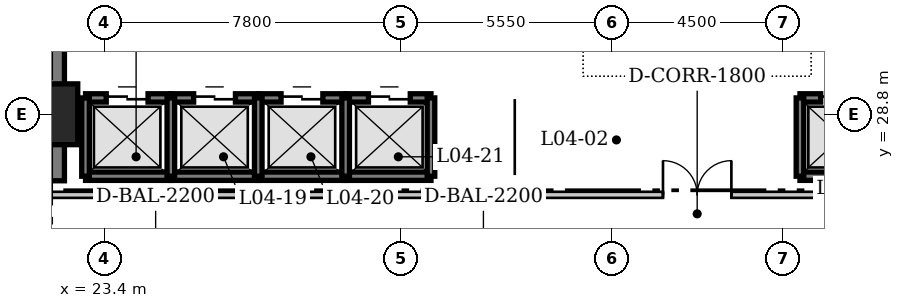
"""IFC4 building model, lengths in metres.
Left out: names, types, materials, properties, quantities, classifications, styles, units other than length and angle.
Written with IfcOpenShell. Run it as: python <this file> out.ifc"""

import sys

from ifc_helpers import new_model, si_unit, direction, frame, frame_2d, origin, origin_2d, place, context, subcontext, project, spatial, rectangle, extrude, element, fill, save


model = new_model("IFC4")
c1 = context("Model", 3, precision=1e-05, world=origin(), true_north=direction((0.0, 1.0)))
c2 = subcontext(c1, "Body", "Model", "MODEL_VIEW")
j1 = project(units=[si_unit("LENGTHUNIT", "METRE"), si_unit("PLANEANGLEUNIT", "RADIAN")], contexts=[c1])
p1 = place(None, origin())
s1 = spatial("IfcSite", under=j1, at=p1, CompositionType="ELEMENT")
p2 = place(p1, origin())
s2 = spatial("IfcBuilding", under=s1, at=p2, CompositionType="ELEMENT")
p3 = place(p2, frame((0.0, 0.0, 20.8)))
s3 = spatial("IfcBuildingStorey", under=s2, at=p3, CompositionType="ELEMENT", Elevation=20.8)
p4 = place(p3, frame((21.9, 27.05, 0.0), z_axis=(0.0, 0.0, 1.0), x_axis=(0.0, 1.0, 0.0)))
e1 = element("IfcWall", 1, at=p4, inside=s3, PredefinedType="SHEAR", context=c2, shape_type="SweptSolid", body=[
    extrude(rectangle(XDim=13.72, YDim=0.9, at=frame_2d((6.86, 0.0))), origin(), (0.0, 0.0, 1.0), 5.2),
])
p5 = place(p3, frame((21.9, 28.8, 0.0), z_axis=(0.0, 0.0, 1.0), x_axis=(1.0, 0.0, 0.0)))
e2 = element("IfcColumn", 2, at=p5, inside=s3, PredefinedType="COLUMN", context=c2, shape_type="SweptSolid", body=[
    extrude(rectangle(XDim=1.6, YDim=1.6, at=origin_2d()), origin(), (0.0, 0.0, 1.0), 5.2),
])
p6 = place(p3, frame((22.905, 29.23, 0.0), z_axis=(0.0, 0.0, 1.0), x_axis=(1.0, 0.0, 0.0)))
e3 = element("IfcWall", 3, at=p6, inside=s3, PredefinedType="SHEAR", context=c2, shape_type="SweptSolid", body=[
    extrude(rectangle(XDim=2.245, YDim=0.22, at=frame_2d((1.123, 0.0))), origin(), (0.0, 0.0, 1.0), 5.2),
])
p7 = place(p6, frame((0.545, 0.0, 0.0)))
e4 = element("IfcOpeningElement", 4, at=p7, cuts=e3, PredefinedType="OPENING", context=c2, shape_type="SweptSolid", body=[
    extrude(rectangle(XDim=1.1, YDim=2.15, at=frame_2d((0.55, 1.075))), frame((0.0, 0.12, 0.0), z_axis=(0.0, -1.0, 0.0), x_axis=(1.0, 0.0, 0.0)), (0.0, 0.0, 1.0), 0.24),
])
p8 = place(p3, frame((22.905, 27.17, 0.0), z_axis=(0.0, 0.0, 1.0), x_axis=(1.0, 0.0, 0.0)))
e5 = element("IfcWall", 5, at=p8, inside=s3, PredefinedType="SHEAR", context=c2, shape_type="SweptSolid", body=[
    extrude(rectangle(XDim=2.245, YDim=0.22, at=frame_2d((1.123, 0.0))), origin(), (0.0, 0.0, 1.0), 5.2),
])
p9 = place(p3, frame((22.905, 27.17, 0.0), z_axis=(0.0, 0.0, 1.0), x_axis=(0.0, 1.0, 0.0)))
e6 = element("IfcWall", 6, at=p9, inside=s3, PredefinedType="SHEAR", context=c2, shape_type="SweptSolid", body=[
    extrude(rectangle(XDim=2.06, YDim=0.2, at=frame_2d((1.03, 0.0))), origin(), (0.0, 0.0, 1.0), 5.2),
])
p10 = place(p3, frame((25.15, 29.23, 0.0), z_axis=(0.0, 0.0, 1.0), x_axis=(1.0, 0.0, 0.0)))
e7 = element("IfcWall", 7, at=p10, inside=s3, PredefinedType="SHEAR", context=c2, shape_type="SweptSolid", body=[
    extrude(rectangle(XDim=2.3, YDim=0.22, at=frame_2d((1.15, 0.0))), origin(), (0.0, 0.0, 1.0), 5.2),
])
p11 = place(p10, frame((0.6, 0.0, 0.0)))
e8 = element("IfcOpeningElement", 8, at=p11, cuts=e7, PredefinedType="OPENING", context=c2, shape_type="SweptSolid", body=[
    extrude(rectangle(XDim=1.1, YDim=2.15, at=frame_2d((0.55, 1.075))), frame((0.0, 0.12, 0.0), z_axis=(0.0, -1.0, 0.0), x_axis=(1.0, 0.0, 0.0)), (0.0, 0.0, 1.0), 0.24),
])
p12 = place(p3, frame((25.15, 27.17, 0.0), z_axis=(0.0, 0.0, 1.0), x_axis=(1.0, 0.0, 0.0)))
e9 = element("IfcWall", 9, at=p12, inside=s3, PredefinedType="SHEAR", context=c2, shape_type="SweptSolid", body=[
    extrude(rectangle(XDim=2.3, YDim=0.22, at=frame_2d((1.15, 0.0))), origin(), (0.0, 0.0, 1.0), 5.2),
])
p13 = place(p3, frame((25.15, 27.17, 0.0), z_axis=(0.0, 0.0, 1.0), x_axis=(0.0, 1.0, 0.0)))
e10 = element("IfcWall", 10, at=p13, inside=s3, PredefinedType="SHEAR", context=c2, shape_type="SweptSolid", body=[
    extrude(rectangle(XDim=2.06, YDim=0.2, at=frame_2d((1.03, 0.0))), origin(), (0.0, 0.0, 1.0), 5.2),
])
p14 = place(p3, frame((27.45, 29.23, 0.0), z_axis=(0.0, 0.0, 1.0), x_axis=(1.0, 0.0, 0.0)))
e11 = element("IfcWall", 11, at=p14, inside=s3, PredefinedType="SHEAR", context=c2, shape_type="SweptSolid", body=[
    extrude(rectangle(XDim=2.3, YDim=0.22, at=frame_2d((1.15, 0.0))), origin(), (0.0, 0.0, 1.0), 5.2),
])
p15 = place(p14, frame((0.6, 0.0, 0.0)))
e12 = element("IfcOpeningElement", 12, at=p15, cuts=e11, PredefinedType="OPENING", context=c2, shape_type="SweptSolid", body=[
    extrude(rectangle(XDim=1.1, YDim=2.15, at=frame_2d((0.55, 1.075))), frame((0.0, 0.12, 0.0), z_axis=(0.0, -1.0, 0.0), x_axis=(1.0, 0.0, 0.0)), (0.0, 0.0, 1.0), 0.24),
])
p16 = place(p3, frame((27.45, 27.17, 0.0), z_axis=(0.0, 0.0, 1.0), x_axis=(1.0, 0.0, 0.0)))
e13 = element("IfcWall", 13, at=p16, inside=s3, PredefinedType="SHEAR", context=c2, shape_type="SweptSolid", body=[
    extrude(rectangle(XDim=2.3, YDim=0.22, at=frame_2d((1.15, 0.0))), origin(), (0.0, 0.0, 1.0), 5.2),
])
p17 = place(p3, frame((27.45, 27.17, 0.0), z_axis=(0.0, 0.0, 1.0), x_axis=(0.0, 1.0, 0.0)))
e14 = element("IfcWall", 14, at=p17, inside=s3, PredefinedType="SHEAR", context=c2, shape_type="SweptSolid", body=[
    extrude(rectangle(XDim=2.06, YDim=0.2, at=frame_2d((1.03, 0.0))), origin(), (0.0, 0.0, 1.0), 5.2),
])
p18 = place(p3, frame((29.75, 29.23, 0.0), z_axis=(0.0, 0.0, 1.0), x_axis=(1.0, 0.0, 0.0)))
e15 = element("IfcWall", 15, at=p18, inside=s3, PredefinedType="SHEAR", context=c2, shape_type="SweptSolid", body=[
    extrude(rectangle(XDim=2.245, YDim=0.22, at=frame_2d((1.123, 0.0))), origin(), (0.0, 0.0, 1.0), 5.2),
])
p19 = place(p18, frame((0.6, 0.0, 0.0)))
e16 = element("IfcOpeningElement", 16, at=p19, cuts=e15, PredefinedType="OPENING", context=c2, shape_type="SweptSolid", body=[
    extrude(rectangle(XDim=1.1, YDim=2.15, at=frame_2d((0.55, 1.075))), frame((0.0, 0.12, 0.0), z_axis=(0.0, -1.0, 0.0), x_axis=(1.0, 0.0, 0.0)), (0.0, 0.0, 1.0), 0.24),
])
p20 = place(p3, frame((29.75, 27.17, 0.0), z_axis=(0.0, 0.0, 1.0), x_axis=(1.0, 0.0, 0.0)))
e17 = element("IfcWall", 17, at=p20, inside=s3, PredefinedType="SHEAR", context=c2, shape_type="SweptSolid", body=[
    extrude(rectangle(XDim=2.245, YDim=0.22, at=frame_2d((1.123, 0.0))), origin(), (0.0, 0.0, 1.0), 5.2),
])
for number, where, z_axis, x_axis in (
    (18, (29.75, 27.17, 0.0), (0.0, 0.0, 1.0), (0.0, 1.0, 0.0)),
    (19, (31.995, 27.17, 0.0), (0.0, 0.0, 1.0), (0.0, 1.0, 0.0)),
):
    element("IfcWall", number, at=place(p3, frame(where, z_axis=z_axis, x_axis=x_axis)), inside=s3, PredefinedType="SHEAR", context=c2, shape_type="SweptSolid", body=[
        extrude(rectangle(XDim=2.06, YDim=0.2, at=frame_2d((1.03, 0.0))), origin(), (0.0, 0.0, 1.0), 5.2),
    ])
p21 = place(p3, frame((41.705, 29.23, 0.0), z_axis=(0.0, 0.0, 1.0), x_axis=(1.0, 0.0, 0.0)))
e20 = element("IfcWall", 20, at=p21, inside=s3, PredefinedType="SHEAR", context=c2, shape_type="SweptSolid", body=[
    extrude(rectangle(XDim=2.245, YDim=0.22, at=frame_2d((1.123, 0.0))), origin(), (0.0, 0.0, 1.0), 5.2),
])
p22 = place(p21, frame((0.545, 0.0, 0.0)))
e21 = element("IfcOpeningElement", 21, at=p22, cuts=e20, PredefinedType="OPENING", context=c2, shape_type="SweptSolid", body=[
    extrude(rectangle(XDim=1.1, YDim=2.15, at=frame_2d((0.55, 1.075))), frame((0.0, 0.12, 0.0), z_axis=(0.0, -1.0, 0.0), x_axis=(1.0, 0.0, 0.0)), (0.0, 0.0, 1.0), 0.24),
])
p23 = place(p3, frame((41.705, 27.17, 0.0), z_axis=(0.0, 0.0, 1.0), x_axis=(1.0, 0.0, 0.0)))
e22 = element("IfcWall", 22, at=p23, inside=s3, PredefinedType="SHEAR", context=c2, shape_type="SweptSolid", body=[
    extrude(rectangle(XDim=2.245, YDim=0.22, at=frame_2d((1.123, 0.0))), origin(), (0.0, 0.0, 1.0), 5.2),
])
p24 = place(p3, frame((41.705, 27.17, 0.0), z_axis=(0.0, 0.0, 1.0), x_axis=(0.0, 1.0, 0.0)))
e23 = element("IfcWall", 23, at=p24, inside=s3, PredefinedType="SHEAR", context=c2, shape_type="SweptSolid", body=[
    extrude(rectangle(XDim=2.06, YDim=0.2, at=frame_2d((1.03, 0.0))), origin(), (0.0, 0.0, 1.0), 5.2),
])
p25 = place(p3, frame((3.22, 26.68, 0.0), z_axis=(0.0, 0.0, 1.0), x_axis=(1.0, 0.0, 0.0)))
e24 = element("IfcWall", 24, at=p25, inside=s3, PredefinedType="PARTITIONING", context=c2, shape_type="SweptSolid", body=[
    extrude(rectangle(XDim=71.56, YDim=0.16, at=frame_2d((35.78, 0.0))), origin(), (0.0, 0.0, 1.0), 4.94),
])
p26 = place(p25, frame((34.88, 0.0, 0.0)))
e25 = element("IfcOpeningElement", 25, at=p26, cuts=e24, PredefinedType="OPENING", context=c2, shape_type="SweptSolid", body=[
    extrude(rectangle(XDim=1.8, YDim=2.2, at=frame_2d((0.9, 1.1))), frame((0.0, 0.09, 0.0), z_axis=(0.0, -1.0, 0.0), x_axis=(1.0, 0.0, 0.0)), (0.0, 0.0, 1.0), 0.18),
])
p27 = place(p25, frame((8.63, 0.0, 0.0)))
e26 = element("IfcOpeningElement", 26, at=p27, cuts=e24, PredefinedType="OPENING", context=c2, shape_type="SweptSolid", body=[
    extrude(rectangle(XDim=1.8, YDim=2.2, at=frame_2d((0.9, 1.1))), frame((0.0, 0.09, 0.0), z_axis=(0.0, -1.0, 0.0), x_axis=(1.0, 0.0, 0.0)), (0.0, 0.0, 1.0), 0.18),
])
p28 = place(p25, frame((61.53, 0.0, 0.0)))
e27 = element("IfcOpeningElement", 27, at=p28, cuts=e24, PredefinedType="OPENING", context=c2, shape_type="SweptSolid", body=[
    extrude(rectangle(XDim=1.8, YDim=2.2, at=frame_2d((0.9, 1.1))), frame((0.0, 0.09, 0.0), z_axis=(0.0, -1.0, 0.0), x_axis=(1.0, 0.0, 0.0)), (0.0, 0.0, 1.0), 0.18),
])
p29 = place(p7, origin())
e28 = element("IfcDoor", 28, at=p29, inside=s3, OperationType="DOUBLE_DOOR_SLIDING", PredefinedType="DOOR", context=c2, shape_type="SweptSolid", body=[
    extrude(rectangle(XDim=1.1, YDim=2.15, at=frame_2d((0.55, 1.075))), frame((0.0, 0.025, 0.0), z_axis=(0.0, -1.0, 0.0), x_axis=(1.0, 0.0, 0.0)), (0.0, 0.0, 1.0), 0.05),
])
fill(e4, e28)
p30 = place(p11, origin())
e29 = element("IfcDoor", 29, at=p30, inside=s3, OperationType="DOUBLE_DOOR_SLIDING", PredefinedType="DOOR", context=c2, shape_type="SweptSolid", body=[
    extrude(rectangle(XDim=1.1, YDim=2.15, at=frame_2d((0.55, 1.075))), frame((0.0, 0.025, 0.0), z_axis=(0.0, -1.0, 0.0), x_axis=(1.0, 0.0, 0.0)), (0.0, 0.0, 1.0), 0.05),
])
fill(e8, e29)
p31 = place(p15, origin())
e30 = element("IfcDoor", 30, at=p31, inside=s3, OperationType="DOUBLE_DOOR_SLIDING", PredefinedType="DOOR", context=c2, shape_type="SweptSolid", body=[
    extrude(rectangle(XDim=1.1, YDim=2.15, at=frame_2d((0.55, 1.075))), frame((0.0, 0.025, 0.0), z_axis=(0.0, -1.0, 0.0), x_axis=(1.0, 0.0, 0.0)), (0.0, 0.0, 1.0), 0.05),
])
fill(e12, e30)
p32 = place(p19, origin())
e31 = element("IfcDoor", 31, at=p32, inside=s3, OperationType="DOUBLE_DOOR_SLIDING", PredefinedType="DOOR", context=c2, shape_type="SweptSolid", body=[
    extrude(rectangle(XDim=1.1, YDim=2.15, at=frame_2d((0.55, 1.075))), frame((0.0, 0.025, 0.0), z_axis=(0.0, -1.0, 0.0), x_axis=(1.0, 0.0, 0.0)), (0.0, 0.0, 1.0), 0.05),
])
fill(e16, e31)
p33 = place(p22, origin())
e32 = element("IfcDoor", 32, at=p33, inside=s3, OperationType="DOUBLE_DOOR_SLIDING", PredefinedType="DOOR", context=c2, shape_type="SweptSolid", body=[
    extrude(rectangle(XDim=1.1, YDim=2.15, at=frame_2d((0.55, 1.075))), frame((0.0, 0.025, 0.0), z_axis=(0.0, -1.0, 0.0), x_axis=(1.0, 0.0, 0.0)), (0.0, 0.0, 1.0), 0.05),
])
fill(e21, e32)
p34 = place(p26, origin())
e33 = element("IfcDoor", 33, at=p34, inside=s3, OperationType="DOUBLE_DOOR_SINGLE_SWING", PredefinedType="DOOR", context=c2, shape_type="SweptSolid", body=[
    extrude(rectangle(XDim=1.8, YDim=2.2, at=frame_2d((0.9, 1.1))), frame((0.0, 0.025, 0.0), z_axis=(0.0, -1.0, 0.0), x_axis=(1.0, 0.0, 0.0)), (0.0, 0.0, 1.0), 0.05),
])
fill(e25, e33)
save(model, sys.argv[1])
